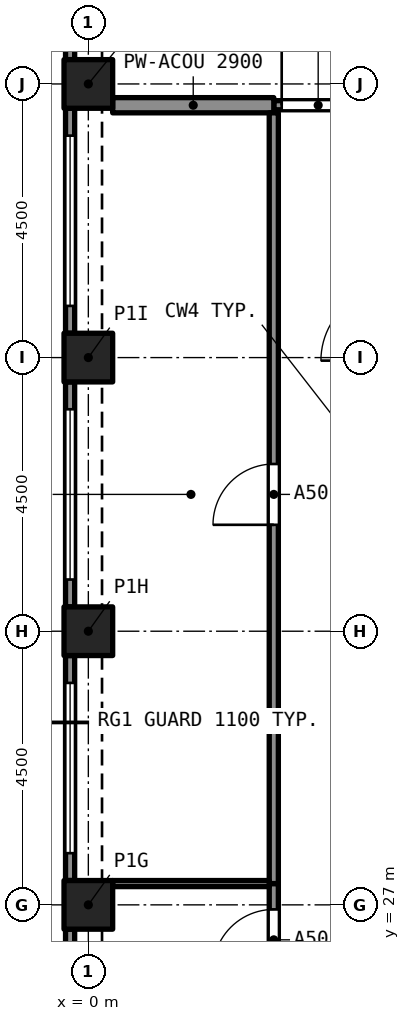
"""IFC4 building model, lengths in metres.
Left out: names, types, materials, properties, quantities, classifications, styles, units other than length and angle.
Written with IfcOpenShell. Run it as: python <this file> out.ifc"""

import sys

from ifc_helpers import new_model, si_unit, direction, frame, frame_2d, origin, origin_2d, place, context, subcontext, project, spatial, rectangle, extrude, element, fill, save


model = new_model("IFC4")
c1 = context("Model", 3, precision=1e-05, world=origin(), true_north=direction((0.0, 1.0)))
c2 = subcontext(c1, "Body", "Model", "MODEL_VIEW")
j1 = project(units=[si_unit("LENGTHUNIT", "METRE"), si_unit("PLANEANGLEUNIT", "RADIAN")], contexts=[c1])
p1 = place(None, origin())
s1 = spatial("IfcSite", under=j1, at=p1, CompositionType="ELEMENT")
p2 = place(p1, origin())
s2 = spatial("IfcBuilding", under=s1, at=p2, CompositionType="ELEMENT")
p3 = place(p2, frame((0.0, 0.0, 182.7)))
s3 = spatial("IfcBuildingStorey", under=s2, at=p3, CompositionType="ELEMENT", Elevation=182.7)
for number, where, z_axis, x_axis in (
    (1, (0.0, 27.0, 0.0), (0.0, 0.0, 1.0), (1.0, 0.0, 0.0)),
    (2, (0.0, 31.5, 0.0), (0.0, 0.0, 1.0), (1.0, 0.0, 0.0)),
    (3, (0.0, 36.0, 0.0), (0.0, 0.0, 1.0), (1.0, 0.0, 0.0)),
    (4, (0.0, 40.5, 0.0), (0.0, 0.0, 1.0), (1.0, 0.0, 0.0)),
):
    element("IfcColumn", number, at=place(p3, frame(where, z_axis=z_axis, x_axis=x_axis)), inside=s3, PredefinedType="COLUMN", context=c2, shape_type="SweptSolid", body=[
        extrude(rectangle(XDim=0.8, YDim=0.8, at=origin_2d()), origin(), (0.0, 0.0, 1.0), 3.2),
    ])
p4 = place(p3, frame((-0.3, 40.9, 0.0), z_axis=(0.0, 0.0, 1.0), x_axis=(0.0, 1.0, 0.0)))
e5 = element("IfcWall", 5, at=p4, inside=s3, PredefinedType="SOLIDWALL", context=c2, shape_type="SweptSolid", body=[
    extrude(rectangle(XDim=3.7, YDim=0.15, at=frame_2d((1.85, 0.0))), origin(), (0.0, 0.0, 1.0), 3.2),
])
p5 = place(p4, frame((0.45, 0.0, 0.45)))
e6 = element("IfcOpeningElement", 6, at=p5, cuts=e5, PredefinedType="OPENING", context=c2, shape_type="SweptSolid", body=[
    extrude(rectangle(XDim=2.8, YDim=1.95, at=frame_2d((1.4, 0.975))), frame((0.0, 0.085, 0.0), z_axis=(0.0, -1.0, 0.0), x_axis=(1.0, 0.0, 0.0)), (0.0, 0.0, 1.0), 0.17),
])
p6 = place(p3, frame((-0.3, 36.4, 0.0), z_axis=(0.0, 0.0, 1.0), x_axis=(0.0, 1.0, 0.0)))
e7 = element("IfcWall", 7, at=p6, inside=s3, PredefinedType="SOLIDWALL", context=c2, shape_type="SweptSolid", body=[
    extrude(rectangle(XDim=3.7, YDim=0.15, at=frame_2d((1.85, 0.0))), origin(), (0.0, 0.0, 1.0), 3.2),
])
p7 = place(p6, frame((0.45, 0.0, 0.45)))
e8 = element("IfcOpeningElement", 8, at=p7, cuts=e7, PredefinedType="OPENING", context=c2, shape_type="SweptSolid", body=[
    extrude(rectangle(XDim=2.8, YDim=1.95, at=frame_2d((1.4, 0.975))), frame((0.0, 0.085, 0.0), z_axis=(0.0, -1.0, 0.0), x_axis=(1.0, 0.0, 0.0)), (0.0, 0.0, 1.0), 0.17),
])
p8 = place(p3, frame((-0.3, 31.9, 0.0), z_axis=(0.0, 0.0, 1.0), x_axis=(0.0, 1.0, 0.0)))
e9 = element("IfcWall", 9, at=p8, inside=s3, PredefinedType="SOLIDWALL", context=c2, shape_type="SweptSolid", body=[
    extrude(rectangle(XDim=3.7, YDim=0.15, at=frame_2d((1.85, 0.0))), origin(), (0.0, 0.0, 1.0), 3.2),
])
p9 = place(p8, frame((0.45, 0.0, 0.45)))
e10 = element("IfcOpeningElement", 10, at=p9, cuts=e9, PredefinedType="OPENING", context=c2, shape_type="SweptSolid", body=[
    extrude(rectangle(XDim=2.8, YDim=1.95, at=frame_2d((1.4, 0.975))), frame((0.0, 0.085, 0.0), z_axis=(0.0, -1.0, 0.0), x_axis=(1.0, 0.0, 0.0)), (0.0, 0.0, 1.0), 0.17),
])
p10 = place(p3, frame((-0.3, 27.4, 0.0), z_axis=(0.0, 0.0, 1.0), x_axis=(0.0, 1.0, 0.0)))
e11 = element("IfcWall", 11, at=p10, inside=s3, PredefinedType="SOLIDWALL", context=c2, shape_type="SweptSolid", body=[
    extrude(rectangle(XDim=3.7, YDim=0.15, at=frame_2d((1.85, 0.0))), origin(), (0.0, 0.0, 1.0), 3.2),
])
p11 = place(p10, frame((0.45, 0.0, 0.45)))
e12 = element("IfcOpeningElement", 12, at=p11, cuts=e11, PredefinedType="OPENING", context=c2, shape_type="SweptSolid", body=[
    extrude(rectangle(XDim=2.8, YDim=1.95, at=frame_2d((1.4, 0.975))), frame((0.0, 0.085, 0.0), z_axis=(0.0, -1.0, 0.0), x_axis=(1.0, 0.0, 0.0)), (0.0, 0.0, 1.0), 0.17),
])
p12 = place(p3, frame((-0.3, 22.9, 0.0), z_axis=(0.0, 0.0, 1.0), x_axis=(0.0, 1.0, 0.0)))
e13 = element("IfcWall", 13, at=p12, inside=s3, PredefinedType="SOLIDWALL", context=c2, shape_type="SweptSolid", body=[
    extrude(rectangle(XDim=3.7, YDim=0.15, at=frame_2d((1.85, 0.0))), origin(), (0.0, 0.0, 1.0), 3.2),
])
p13 = place(p12, frame((0.45, 0.0, 0.45)))
e14 = element("IfcOpeningElement", 14, at=p13, cuts=e13, PredefinedType="OPENING", context=c2, shape_type="SweptSolid", body=[
    extrude(rectangle(XDim=2.8, YDim=1.95, at=frame_2d((1.4, 0.975))), frame((0.0, 0.085, 0.0), z_axis=(0.0, -1.0, 0.0), x_axis=(1.0, 0.0, 0.0)), (0.0, 0.0, 1.0), 0.17),
])
p14 = place(p3, frame((3.05, 40.15, 0.0), z_axis=(0.0, 0.0, 1.0), x_axis=(1.0, 0.0, 0.0)))
e15 = element("IfcWall", 15, at=p14, inside=s3, PredefinedType="PARTITIONING", context=c2, shape_type="SweptSolid", body=[
    extrude(rectangle(XDim=1.8, YDim=0.15, at=frame_2d((0.9, 0.0))), origin(), (0.0, 0.0, 1.0), 2.9),
])
p15 = place(p14, frame((0.13, 0.0, 0.0)))
e16 = element("IfcOpeningElement", 16, at=p15, cuts=e15, PredefinedType="OPENING", context=c2, shape_type="SweptSolid", body=[
    extrude(rectangle(XDim=1.2, YDim=2.4, at=frame_2d((0.6, 1.2))), frame((0.0, 0.085, 0.0), z_axis=(0.0, -1.0, 0.0), x_axis=(1.0, 0.0, 0.0)), (0.0, 0.0, 1.0), 0.17),
])
p16 = place(p3, frame((0.4, 40.15, 0.0), z_axis=(0.0, 0.0, 1.0), x_axis=(1.0, 0.0, 0.0)))
e17 = element("IfcWall", 17, at=p16, inside=s3, PredefinedType="PARTITIONING", context=c2, shape_type="SweptSolid", body=[
    extrude(rectangle(XDim=2.65, YDim=0.25, at=frame_2d((1.325, 0.0))), origin(), (0.0, 0.0, 1.0), 2.9),
])
p17 = place(p3, frame((3.05, 25.425, 0.0), z_axis=(0.0, 0.0, 1.0), x_axis=(0.0, 1.0, 0.0)))
e18 = element("IfcWall", 18, at=p17, inside=s3, PredefinedType="PARTITIONING", context=c2, shape_type="SweptSolid", body=[
    extrude(rectangle(XDim=1.925, YDim=0.15, at=frame_2d((0.962, 0.0))), origin(), (0.0, 0.0, 1.0), 2.9),
])
p18 = place(p17, frame((0.5, 0.0, 0.0)))
e19 = element("IfcOpeningElement", 19, at=p18, cuts=e18, PredefinedType="OPENING", context=c2, shape_type="SweptSolid", body=[
    extrude(rectangle(XDim=1.0, YDim=2.1, at=frame_2d((0.5, 1.05))), frame((0.0, 0.085, 0.0), z_axis=(0.0, -1.0, 0.0), x_axis=(1.0, 0.0, 0.0)), (0.0, 0.0, 1.0), 0.17),
])
p19 = place(p3, frame((3.05, 27.35, 0.0), z_axis=(0.0, 0.0, 1.0), x_axis=(0.0, 1.0, 0.0)))
e20 = element("IfcWall", 20, at=p19, inside=s3, PredefinedType="PARTITIONING", context=c2, shape_type="SweptSolid", body=[
    extrude(rectangle(XDim=12.675, YDim=0.15, at=frame_2d((6.337, 0.0))), origin(), (0.0, 0.0, 1.0), 2.9),
])
p20 = place(p19, frame((5.9, 0.0, 0.0)))
e21 = element("IfcOpeningElement", 21, at=p20, cuts=e20, PredefinedType="OPENING", context=c2, shape_type="SweptSolid", body=[
    extrude(rectangle(XDim=1.0, YDim=2.1, at=frame_2d((0.5, 1.05))), frame((0.0, 0.085, 0.0), z_axis=(0.0, -1.0, 0.0), x_axis=(1.0, 0.0, 0.0)), (0.0, 0.0, 1.0), 0.17),
])
p21 = place(p3, frame((0.4, 27.35, 0.0), z_axis=(0.0, 0.0, 1.0), x_axis=(1.0, 0.0, 0.0)))
e22 = element("IfcWall", 22, at=p21, inside=s3, PredefinedType="PARTITIONING", context=c2, shape_type="SweptSolid", body=[
    extrude(rectangle(XDim=2.575, YDim=0.1, at=frame_2d((1.288, 0.0))), origin(), (0.0, 0.0, 1.0), 2.9),
])
p22 = place(p7, origin())
e23 = element("IfcWindow", 23, at=p22, inside=s3, PartitioningType="SINGLE_PANEL", PredefinedType="WINDOW", context=c2, shape_type="SweptSolid", body=[
    extrude(rectangle(XDim=2.8, YDim=1.95, at=frame_2d((1.4, 0.975))), frame((0.0, 0.03, 0.0), z_axis=(0.0, -1.0, 0.0), x_axis=(1.0, 0.0, 0.0)), (0.0, 0.0, 1.0), 0.06),
])
fill(e8, e23)
p23 = place(p9, origin())
e24 = element("IfcWindow", 24, at=p23, inside=s3, PartitioningType="SINGLE_PANEL", PredefinedType="WINDOW", context=c2, shape_type="SweptSolid", body=[
    extrude(rectangle(XDim=2.8, YDim=1.95, at=frame_2d((1.4, 0.975))), frame((0.0, 0.03, 0.0), z_axis=(0.0, -1.0, 0.0), x_axis=(1.0, 0.0, 0.0)), (0.0, 0.0, 1.0), 0.06),
])
fill(e10, e24)
p24 = place(p11, origin())
e25 = element("IfcWindow", 25, at=p24, inside=s3, PartitioningType="SINGLE_PANEL", PredefinedType="WINDOW", context=c2, shape_type="SweptSolid", body=[
    extrude(rectangle(XDim=2.8, YDim=1.95, at=frame_2d((1.4, 0.975))), frame((0.0, 0.03, 0.0), z_axis=(0.0, -1.0, 0.0), x_axis=(1.0, 0.0, 0.0)), (0.0, 0.0, 1.0), 0.06),
])
fill(e12, e25)
p25 = place(p15, origin())
e26 = element("IfcDoor", 26, at=p25, inside=s3, OperationType="SINGLE_SWING_LEFT", PredefinedType="DOOR", context=c2, shape_type="SweptSolid", body=[
    extrude(rectangle(XDim=1.2, YDim=2.4, at=frame_2d((0.6, 1.2))), frame((0.0, 0.025, 0.0), z_axis=(0.0, -1.0, 0.0), x_axis=(1.0, 0.0, 0.0)), (0.0, 0.0, 1.0), 0.05),
])
fill(e16, e26)
p26 = place(p18, origin())
e27 = element("IfcDoor", 27, at=p26, inside=s3, OperationType="SINGLE_SWING_RIGHT", PredefinedType="DOOR", context=c2, shape_type="SweptSolid", body=[
    extrude(rectangle(XDim=1.0, YDim=2.1, at=frame_2d((0.5, 1.05))), frame((0.0, 0.025, 0.0), z_axis=(0.0, -1.0, 0.0), x_axis=(1.0, 0.0, 0.0)), (0.0, 0.0, 1.0), 0.05),
])
fill(e19, e27)
p27 = place(p20, origin())
e28 = element("IfcDoor", 28, at=p27, inside=s3, OperationType="SINGLE_SWING_RIGHT", PredefinedType="DOOR", context=c2, shape_type="SweptSolid", body=[
    extrude(rectangle(XDim=1.0, YDim=2.1, at=frame_2d((0.5, 1.05))), frame((0.0, 0.025, 0.0), z_axis=(0.0, -1.0, 0.0), x_axis=(1.0, 0.0, 0.0)), (0.0, 0.0, 1.0), 0.05),
])
fill(e21, e28)
save(model, sys.argv[1])
